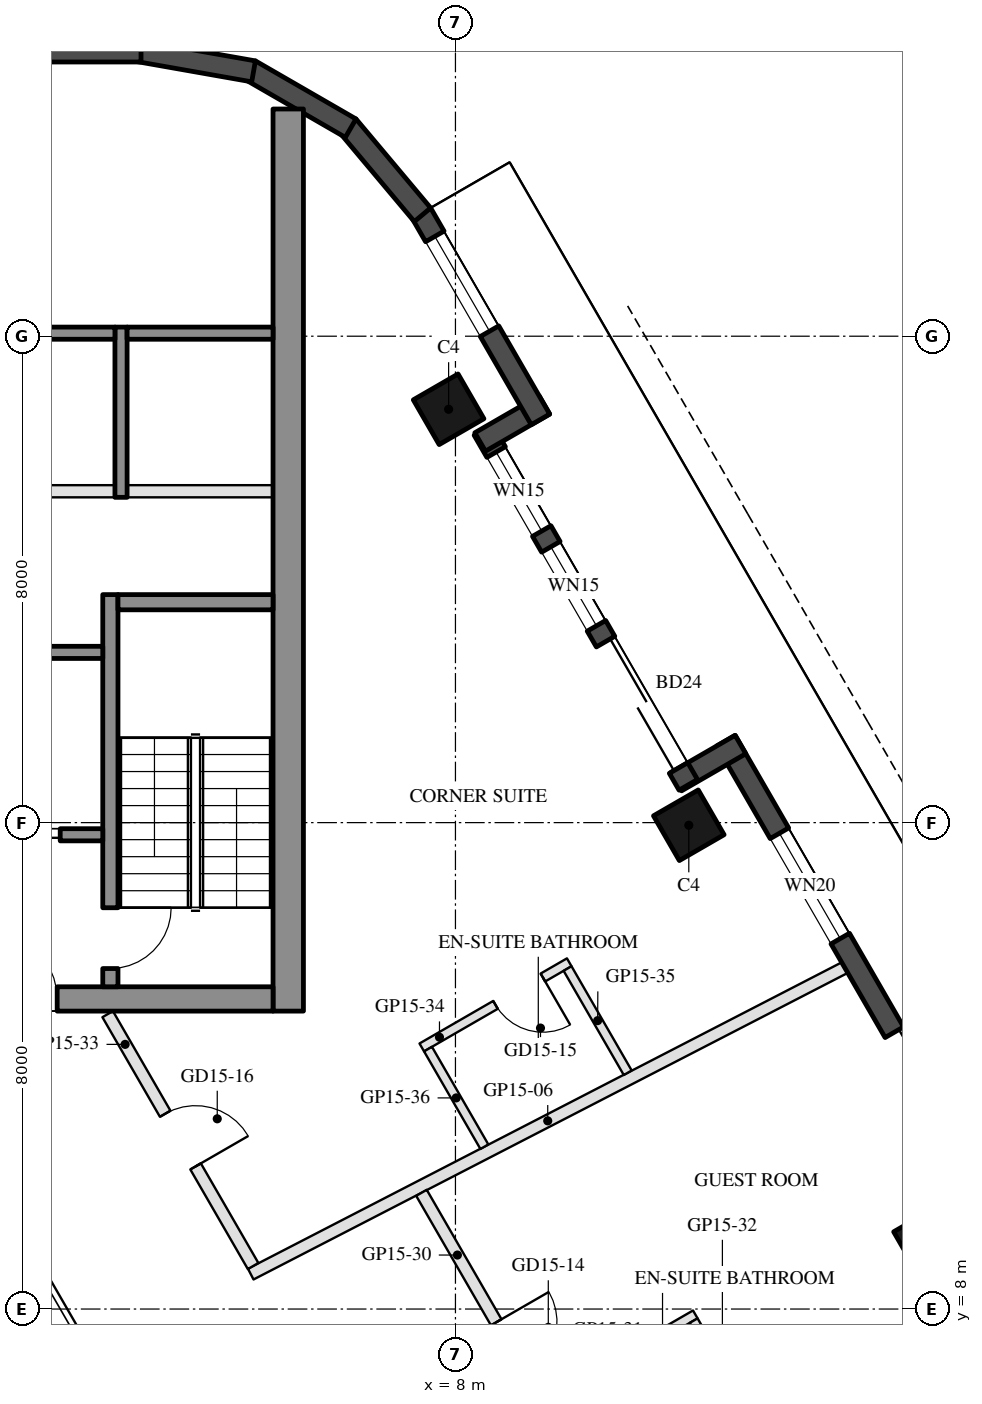
"""IFC4 building model, lengths in metres.
Left out: names, types, materials, properties, quantities, classifications, styles, units other than length and angle.
Written with IfcOpenShell. Run it as: python <this file> out.ifc"""

import sys

from ifc_helpers import new_model, si_unit, direction, frame, frame_2d, origin, origin_2d, place, context, subcontext, project, spatial, rectangle, hollow_rectangle, extrude, element, fill, save


model = new_model("IFC4")
c1 = context("Model", 3, precision=1e-05, world=origin(), true_north=direction((0.0, 1.0)))
c2 = subcontext(c1, "Body", "Model", "MODEL_VIEW")
j1 = project(units=[si_unit("LENGTHUNIT", "METRE"), si_unit("PLANEANGLEUNIT", "RADIAN")], contexts=[c1])
p1 = place(None, origin())
s1 = spatial("IfcSite", under=j1, at=p1, CompositionType="ELEMENT")
p2 = place(p1, origin())
s2 = spatial("IfcBuilding", under=s1, at=p2, CompositionType="ELEMENT")
p3 = place(p2, frame((0.0, 0.0, 168.8)))
s3 = spatial("IfcBuildingStorey", under=s2, at=p3, CompositionType="ELEMENT", Elevation=168.8)
for number, where, z_axis, x_axis in (
    (1, (15.788, 9.115, 0.0), (0.0, 0.0, 1.0), (-0.5, 0.866, 0.0)),
    (2, (11.838, 15.957, 0.0), (0.0, 0.0, 1.0), (-0.5, 0.866, 0.0)),
    (3, (7.888, 22.798, 0.0), (0.0, 0.0, 1.0), (-0.5, 0.866, 0.0)),
):
    element("IfcColumn", number, at=place(p3, frame(where, z_axis=z_axis, x_axis=x_axis)), inside=s3, PredefinedType="COLUMN", context=c2, shape_type="SweptSolid", body=[
        extrude(hollow_rectangle(XDim=0.85, YDim=0.85, WallThickness=0.04, at=origin_2d()), origin(), (0.0, 0.0, 1.0), 3.7),
    ])
p4 = place(p3, frame((17.299, 8.948, 0.0), z_axis=(0.0, 0.0, 1.0), x_axis=(-0.500010041276, 0.866019606374, 0.0)))
e4 = element("IfcWall", 4, at=p4, inside=s3, PredefinedType="SOLIDWALL", context=c2, shape_type="SweptSolid", body=[
    extrude(rectangle(XDim=9.7, YDim=0.35, at=frame_2d((4.85, 0.0))), origin(), (0.0, 0.0, 1.0), 3.55),
])
p5 = place(p4, frame((1.762, 0.0, 0.0)))
e5 = element("IfcOpeningElement", 5, at=p5, cuts=e4, PredefinedType="OPENING", context=c2, shape_type="SweptSolid", body=[
    extrude(rectangle(XDim=2.4, YDim=2.4, at=frame_2d((1.2, 1.2))), frame((0.0, 0.185, 0.0), z_axis=(0.0, -1.0, 0.0), x_axis=(1.0, 0.0, 0.0)), (0.0, 0.0, 1.0), 0.37),
])
p6 = place(p4, frame((5.941, 0.0, 0.3)))
e6 = element("IfcOpeningElement", 6, at=p6, cuts=e4, PredefinedType="OPENING", context=c2, shape_type="SweptSolid", body=[
    extrude(rectangle(XDim=2.0, YDim=2.65, at=frame_2d((1.0, 1.325))), frame((0.0, 0.185, 0.0), z_axis=(0.0, -1.0, 0.0), x_axis=(1.0, 0.0, 0.0)), (0.0, 0.0, 1.0), 0.37),
])
p7 = place(p3, frame((12.688, 17.284, 0.0), z_axis=(0.0, 0.0, 1.0), x_axis=(-0.865955602162, -0.500120880472, 0.0)))
e7 = element("IfcWall", 7, at=p7, inside=s3, PredefinedType="SOLIDWALL", context=c2, shape_type="SweptSolid", body=[
    extrude(rectangle(XDim=1.22, YDim=0.35, at=frame_2d((0.61, 0.0))), origin(), (0.0, 0.0, 1.0), 3.55),
])
p8 = place(p3, frame((11.829, 16.621, 0.0), z_axis=(0.0, 0.0, 1.0), x_axis=(-0.500003597184, 0.866023326939, 0.0)))
e8 = element("IfcWall", 8, at=p8, inside=s3, PredefinedType="SOLIDWALL", context=c2, shape_type="SweptSolid", body=[
    extrude(rectangle(XDim=6.74, YDim=0.35, at=frame_2d((3.37, 0.0))), origin(), (0.0, 0.0, 1.0), 3.55),
])
p9 = place(p8, frame((0.32, 0.0, 0.0)))
e9 = element("IfcOpeningElement", 9, at=p9, cuts=e8, PredefinedType="OPENING", context=c2, shape_type="SweptSolid", body=[
    extrude(rectangle(XDim=2.4, YDim=2.4, at=frame_2d((1.2, 1.2))), frame((0.0, 0.185, 0.0), z_axis=(0.0, -1.0, 0.0), x_axis=(1.0, 0.0, 0.0)), (0.0, 0.0, 1.0), 0.37),
])
p10 = place(p8, frame((3.02, 0.0, 0.3)))
e10 = element("IfcOpeningElement", 10, at=p10, cuts=e8, PredefinedType="OPENING", context=c2, shape_type="SweptSolid", body=[
    extrude(rectangle(XDim=1.5, YDim=2.65, at=frame_2d((0.75, 1.325))), frame((0.0, 0.185, 0.0), z_axis=(0.0, -1.0, 0.0), x_axis=(1.0, 0.0, 0.0)), (0.0, 0.0, 1.0), 0.37),
])
p11 = place(p8, frame((4.82, 0.0, 0.3)))
e11 = element("IfcOpeningElement", 11, at=p11, cuts=e8, PredefinedType="OPENING", context=c2, shape_type="SweptSolid", body=[
    extrude(rectangle(XDim=1.5, YDim=2.65, at=frame_2d((0.75, 1.325))), frame((0.0, 0.185, 0.0), z_axis=(0.0, -1.0, 0.0), x_axis=(1.0, 0.0, 0.0)), (0.0, 0.0, 1.0), 0.37),
])
p12 = place(p3, frame((8.406, 22.26, 0.0), z_axis=(0.0, 0.0, 1.0), x_axis=(0.865955602162, 0.500120880472, 0.0)))
e12 = element("IfcWall", 12, at=p12, inside=s3, PredefinedType="SOLIDWALL", context=c2, shape_type="SweptSolid", body=[
    extrude(rectangle(XDim=1.22, YDim=0.35, at=frame_2d((0.61, 0.0))), origin(), (0.0, 0.0, 1.0), 3.55),
])
p13 = place(p3, frame((9.398, 22.631, 0.0), z_axis=(0.0, 0.0, 1.0), x_axis=(-0.499954521343, 0.866051659307, 0.0)))
e13 = element("IfcWall", 13, at=p13, inside=s3, PredefinedType="SOLIDWALL", context=c2, shape_type="SweptSolid", body=[
    extrude(rectangle(XDim=3.916, YDim=0.35, at=frame_2d((1.958, 0.0))), origin(), (0.0, 0.0, 1.0), 3.55),
])
p14 = place(p13, frame((1.675, 0.0, 0.3)))
e14 = element("IfcOpeningElement", 14, at=p14, cuts=e13, PredefinedType="OPENING", context=c2, shape_type="SweptSolid", body=[
    extrude(rectangle(XDim=1.8, YDim=2.65, at=frame_2d((0.9, 1.325))), frame((0.0, 0.185, 0.0), z_axis=(0.0, -1.0, 0.0), x_axis=(1.0, 0.0, 0.0)), (0.0, 0.0, 1.0), 0.37),
])
p15 = place(p3, frame((7.458, 25.998, 0.0), z_axis=(0.0, 0.0, 1.0), x_axis=(-0.642808304945, 0.766027077259, 0.0)))
e15 = element("IfcWall", 15, at=p15, inside=s3, PredefinedType="SOLIDWALL", context=c2, shape_type="SweptSolid", body=[
    extrude(rectangle(XDim=1.91, YDim=0.35, at=frame_2d((0.955, 0.0))), origin(), (0.0, 0.0, 1.0), 3.55),
])
for number, where, z_axis, x_axis in (
    (16, (6.277, 27.422, 0.0), (0.0, 0.0, 1.0), (-0.866, 0.5, 0.0)),
    (17, (4.68, 28.356, 0.0), (0.0, 0.0, 1.0), (-0.985, 0.174, 0.0)),
):
    element("IfcWall", number, at=place(p3, frame(where, z_axis=z_axis, x_axis=x_axis)), inside=s3, PredefinedType="SOLIDWALL", context=c2, shape_type="SweptSolid", body=[
        extrude(rectangle(XDim=1.91, YDim=0.35, at=frame_2d((0.955, 0.0))), origin(), (0.0, 0.0, 1.0), 3.55),
    ])
p16 = place(p3, frame((2.829, 28.685, 0.0), z_axis=(0.0, 0.0, 1.0), x_axis=(-1.0, 0.0, 0.0)))
e18 = element("IfcWall", 18, at=p16, inside=s3, PredefinedType="SOLIDWALL", context=c2, shape_type="SweptSolid", body=[
    extrude(rectangle(XDim=5.658, YDim=0.35, at=frame_2d((2.829, 0.0))), origin(), (0.0, 0.0, 1.0), 3.55),
])
p17 = place(p3, frame((5.25, 12.9, 0.0), z_axis=(0.0, 0.0, 1.0), x_axis=(0.0, 1.0, 0.0)))
e19 = element("IfcWall", 19, at=p17, inside=s3, PredefinedType="SHEAR", context=c2, shape_type="SweptSolid", body=[
    extrude(rectangle(XDim=14.837, YDim=0.5, at=frame_2d((7.418, 0.0))), origin(), (0.0, 0.0, 1.0), 3.5),
])
p18 = place(p3, frame((5.0, 13.1, 0.0), z_axis=(0.0, 0.0, 1.0), x_axis=(-1.0, 0.0, 0.0)))
e20 = element("IfcWall", 20, at=p18, inside=s3, PredefinedType="SHEAR", context=c2, shape_type="SweptSolid", body=[
    extrude(rectangle(XDim=10.0, YDim=0.4, at=frame_2d((5.0, 0.0))), origin(), (0.0, 0.0, 1.0), 3.5),
])
p19 = place(p18, frame((3.55, 0.0, 0.0)))
e21 = element("IfcOpeningElement", 21, at=p19, cuts=e20, PredefinedType="OPENING", context=c2, shape_type="SweptSolid", body=[
    extrude(rectangle(XDim=1.1, YDim=2.1, at=frame_2d((0.55, 1.05))), frame((0.0, 0.21, 0.0), z_axis=(0.0, -1.0, 0.0), x_axis=(1.0, 0.0, 0.0)), (0.0, 0.0, 1.0), 0.42),
])
p20 = place(p18, frame((5.85, 0.0, 0.0)))
e22 = element("IfcOpeningElement", 22, at=p20, cuts=e20, PredefinedType="OPENING", context=c2, shape_type="SweptSolid", body=[
    extrude(rectangle(XDim=1.4, YDim=2.1, at=frame_2d((0.7, 1.05))), frame((0.0, 0.21, 0.0), z_axis=(0.0, -1.0, 0.0), x_axis=(1.0, 0.0, 0.0)), (0.0, 0.0, 1.0), 0.42),
])
p21 = place(p3, frame((2.325, 13.3, 0.0), z_axis=(0.0, 0.0, 1.0), x_axis=(0.0, 1.0, 0.0)))
e23 = element("IfcWall", 23, at=p21, inside=s3, PredefinedType="SHEAR", context=c2, shape_type="SweptSolid", body=[
    extrude(rectangle(XDim=6.45, YDim=0.25, at=frame_2d((3.225, 0.0))), origin(), (0.0, 0.0, 1.0), 3.5),
])
p22 = place(p21, frame((0.3, 0.0, 0.0)))
e24 = element("IfcOpeningElement", 24, at=p22, cuts=e23, PredefinedType="OPENING", context=c2, shape_type="SweptSolid", body=[
    extrude(rectangle(XDim=1.0, YDim=2.1, at=frame_2d((0.5, 1.05))), frame((0.0, 0.135, 0.0), z_axis=(0.0, -1.0, 0.0), x_axis=(1.0, 0.0, 0.0)), (0.0, 0.0, 1.0), 0.27),
])
p23 = place(p3, frame((5.0, 19.625, 0.0), z_axis=(0.0, 0.0, 1.0), x_axis=(-1.0, 0.0, 0.0)))
e25 = element("IfcWall", 25, at=p23, inside=s3, PredefinedType="SHEAR", context=c2, shape_type="SweptSolid", body=[
    extrude(rectangle(XDim=2.55, YDim=0.25, at=frame_2d((1.275, 0.0))), origin(), (0.0, 0.0, 1.0), 3.5),
])
p24 = place(p3, frame((2.2, 18.8, 0.0), z_axis=(0.0, 0.0, 1.0), x_axis=(-1.0, 0.0, 0.0)))
e26 = element("IfcWall", 26, at=p24, inside=s3, PredefinedType="SHEAR", context=c2, shape_type="SweptSolid", body=[
    extrude(rectangle(XDim=2.8, YDim=0.2, at=frame_2d((1.4, 0.0))), origin(), (0.0, 0.0, 1.0), 3.5),
])
p25 = place(p3, frame((2.2, 15.8, 0.0), z_axis=(0.0, 0.0, 1.0), x_axis=(-1.0, 0.0, 0.0)))
e27 = element("IfcWall", 27, at=p25, inside=s3, PredefinedType="SHEAR", context=c2, shape_type="SweptSolid", body=[
    extrude(rectangle(XDim=2.8, YDim=0.2, at=frame_2d((1.4, 0.0))), origin(), (0.0, 0.0, 1.0), 3.5),
])
p26 = place(p25, frame((0.7, 0.0, 0.0)))
e28 = element("IfcOpeningElement", 28, at=p26, cuts=e27, PredefinedType="OPENING", context=c2, shape_type="SweptSolid", body=[
    extrude(rectangle(XDim=1.2, YDim=2.1, at=frame_2d((0.6, 1.05))), frame((0.0, 0.11, 0.0), z_axis=(0.0, -1.0, 0.0), x_axis=(1.0, 0.0, 0.0)), (0.0, 0.0, 1.0), 0.22),
])
p27 = place(p3, frame((2.5, 21.35, 0.0), z_axis=(0.0, 0.0, 1.0), x_axis=(0.0, 1.0, 0.0)))
e29 = element("IfcWall", 29, at=p27, inside=s3, PredefinedType="SHEAR", context=c2, shape_type="SweptSolid", body=[
    extrude(rectangle(XDim=2.8, YDim=0.2, at=frame_2d((1.4, 0.0))), origin(), (0.0, 0.0, 1.0), 3.5),
])
p28 = place(p3, frame((5.0, 24.05, 0.0), z_axis=(0.0, 0.0, 1.0), x_axis=(-1.0, 0.0, 0.0)))
e30 = element("IfcWall", 30, at=p28, inside=s3, PredefinedType="SHEAR", context=c2, shape_type="SweptSolid", body=[
    extrude(rectangle(XDim=2.4, YDim=0.2, at=frame_2d((1.2, 0.0))), origin(), (0.0, 0.0, 1.0), 3.5),
])
p29 = place(p3, frame((2.4, 24.05, 0.0), z_axis=(0.0, 0.0, 1.0), x_axis=(-1.0, 0.0, 0.0)))
e31 = element("IfcWall", 31, at=p29, inside=s3, PredefinedType="SHEAR", context=c2, shape_type="SweptSolid", body=[
    extrude(rectangle(XDim=2.8, YDim=0.2, at=frame_2d((1.4, 0.0))), origin(), (0.0, 0.0, 1.0), 3.5),
])
p30 = place(p3, frame((5.0, 21.45, 0.0), z_axis=(0.0, 0.0, 1.0), x_axis=(-1.0, 0.0, 0.0)))
e32 = element("IfcWall", 32, at=p30, inside=s3, PredefinedType="PARTITIONING", context=c2, shape_type="SweptSolid", body=[
    extrude(rectangle(XDim=2.4, YDim=0.2, at=frame_2d((1.2, 0.0))), origin(), (0.0, 0.0, 1.0), 3.5),
])
p31 = place(p3, frame((2.4, 21.45, 0.0), z_axis=(0.0, 0.0, 1.0), x_axis=(-1.0, 0.0, 0.0)))
e33 = element("IfcWall", 33, at=p31, inside=s3, PredefinedType="PARTITIONING", context=c2, shape_type="SweptSolid", body=[
    extrude(rectangle(XDim=2.8, YDim=0.2, at=frame_2d((1.4, 0.0))), origin(), (0.0, 0.0, 1.0), 3.5),
])
p32 = place(p3, frame((16.543, 8.106, 0.0), z_axis=(0.0, 0.0, 1.0), x_axis=(-0.873587451419, -0.486667201199, 0.0)))
e34 = element("IfcWall", 34, at=p32, inside=s3, PredefinedType="PARTITIONING", context=c2, shape_type="SweptSolid", body=[
    extrude(rectangle(XDim=7.081, YDim=0.2, at=frame_2d((3.541, 0.0))), origin(), (0.0, 0.0, 1.0), 3.06),
])
p33 = place(p3, frame((14.402, 13.615, 0.0), z_axis=(0.0, 0.0, 1.0), x_axis=(-0.888691893785, -0.458504872299, 0.0)))
e35 = element("IfcWall", 35, at=p33, inside=s3, PredefinedType="PARTITIONING", context=c2, shape_type="SweptSolid", body=[
    extrude(rectangle(XDim=10.992, YDim=0.2, at=frame_2d((5.496, 0.0))), origin(), (0.0, 0.0, 1.0), 3.06),
])
p34 = place(p3, frame((7.441, 9.911, 0.0), z_axis=(0.0, 0.0, 1.0), x_axis=(0.500006275671, -0.866021780494, 0.0)))
e36 = element("IfcWall", 36, at=p34, inside=s3, PredefinedType="PARTITIONING", context=c2, shape_type="SweptSolid", body=[
    extrude(rectangle(XDim=5.907, YDim=0.2, at=frame_2d((2.954, 0.0))), origin(), (0.0, 0.0, 1.0), 2.95),
])
p35 = place(p34, frame((2.458, 0.0, 0.0)))
e37 = element("IfcOpeningElement", 37, at=p35, cuts=e36, PredefinedType="OPENING", context=c2, shape_type="SweptSolid", body=[
    extrude(rectangle(XDim=1.0, YDim=2.1, at=frame_2d((0.5, 1.05))), frame((0.0, 0.11, 0.0), z_axis=(0.0, -1.0, 0.0), x_axis=(1.0, 0.0, 0.0)), (0.0, 0.0, 1.0), 0.22),
])
p36 = place(p3, frame((11.945, 7.911, 0.0), z_axis=(0.0, 0.0, 1.0), x_axis=(-0.865996816683, -0.500049511043, 0.0)))
e38 = element("IfcWall", 38, at=p36, inside=s3, PredefinedType="PARTITIONING", context=c2, shape_type="SweptSolid", body=[
    extrude(rectangle(XDim=2.8, YDim=0.15, at=frame_2d((1.4, 0.0))), origin(), (0.0, 0.0, 1.0), 3.55),
])
p37 = place(p36, frame((0.5, 0.0, 0.0)))
e39 = element("IfcOpeningElement", 39, at=p37, cuts=e38, PredefinedType="OPENING", context=c2, shape_type="SweptSolid", body=[
    extrude(rectangle(XDim=0.9, YDim=2.1, at=frame_2d((0.45, 1.05))), frame((0.0, 0.085, 0.0), z_axis=(0.0, -1.0, 0.0), x_axis=(1.0, 0.0, 0.0)), (0.0, 0.0, 1.0), 0.17),
])
p38 = place(p3, frame((12.863, 6.171, 0.0), z_axis=(0.0, 0.0, 1.0), x_axis=(-0.499998034377, 0.866026538634, 0.0)))
e40 = element("IfcWall", 40, at=p38, inside=s3, PredefinedType="PARTITIONING", context=c2, shape_type="SweptSolid", body=[
    extrude(rectangle(XDim=1.892, YDim=0.15, at=frame_2d((0.946, 0.0))), origin(), (0.0, 0.0, 1.0), 2.95),
])
p39 = place(p3, frame((2.281, 12.85, 0.0), z_axis=(0.0, 0.0, 1.0), x_axis=(0.499981649923, -0.866035997947, 0.0)))
e41 = element("IfcWall", 41, at=p39, inside=s3, PredefinedType="PARTITIONING", context=c2, shape_type="SweptSolid", body=[
    extrude(rectangle(XDim=4.783, YDim=0.2, at=frame_2d((2.392, 0.0))), origin(), (0.0, 0.0, 1.0), 2.95),
])
p40 = place(p39, frame((1.892, 0.0, 0.0)))
e42 = element("IfcOpeningElement", 42, at=p40, cuts=e41, PredefinedType="OPENING", context=c2, shape_type="SweptSolid", body=[
    extrude(rectangle(XDim=1.0, YDim=2.1, at=frame_2d((0.5, 1.05))), frame((0.0, 0.11, 0.0), z_axis=(0.0, -1.0, 0.0), x_axis=(1.0, 0.0, 0.0)), (0.0, 0.0, 1.0), 0.22),
])
p41 = place(p3, frame((9.871, 13.702, 0.0), z_axis=(0.0, 0.0, 1.0), x_axis=(-0.866034573852, -0.49998411664, 0.0)))
e43 = element("IfcWall", 43, at=p41, inside=s3, PredefinedType="PARTITIONING", context=c2, shape_type="SweptSolid", body=[
    extrude(rectangle(XDim=2.8, YDim=0.15, at=frame_2d((1.4, 0.0))), origin(), (0.0, 0.0, 1.0), 3.55),
])
p42 = place(p41, frame((0.5, 0.0, 0.0)))
e44 = element("IfcOpeningElement", 44, at=p42, cuts=e43, PredefinedType="OPENING", context=c2, shape_type="SweptSolid", body=[
    extrude(rectangle(XDim=0.9, YDim=2.1, at=frame_2d((0.45, 1.05))), frame((0.0, 0.085, 0.0), z_axis=(0.0, -1.0, 0.0), x_axis=(1.0, 0.0, 0.0)), (0.0, 0.0, 1.0), 0.17),
])
p43 = place(p3, frame((10.833, 11.886, 0.0), z_axis=(0.0, 0.0, 1.0), x_axis=(-0.500000102728, 0.866025344474, 0.0)))
e45 = element("IfcWall", 45, at=p43, inside=s3, PredefinedType="PARTITIONING", context=c2, shape_type="SweptSolid", body=[
    extrude(rectangle(XDim=1.979, YDim=0.15, at=frame_2d((0.99, 0.0))), origin(), (0.0, 0.0, 1.0), 3.55),
])
p44 = place(p3, frame((8.476, 10.67, 0.0), z_axis=(0.0, 0.0, 1.0), x_axis=(-0.499992292652, 0.866029853578, 0.0)))
e46 = element("IfcWall", 46, at=p44, inside=s3, PredefinedType="PARTITIONING", context=c2, shape_type="SweptSolid", body=[
    extrude(rectangle(XDim=1.854, YDim=0.15, at=frame_2d((0.927, 0.0))), origin(), (0.0, 0.0, 1.0), 3.55),
])
p45 = place(p5, frame((2.4, 0.0, 0.0), z_axis=(0.0, 0.0, 1.0), x_axis=(-1.0, 0.0, 0.0)))
e47 = element("IfcDoor", 47, at=p45, inside=s3, OperationType="SLIDING_TO_LEFT", PredefinedType="DOOR", context=c2, shape_type="SweptSolid", body=[
    extrude(rectangle(XDim=2.4, YDim=2.4, at=frame_2d((1.2, 1.2))), frame((0.0, 0.025, 0.0), z_axis=(0.0, -1.0, 0.0), x_axis=(1.0, 0.0, 0.0)), (0.0, 0.0, 1.0), 0.05),
])
fill(e5, e47)
p46 = place(p6, origin())
e48 = element("IfcWindow", 48, at=p46, inside=s3, PartitioningType="SINGLE_PANEL", PredefinedType="WINDOW", context=c2, shape_type="SweptSolid", body=[
    extrude(rectangle(XDim=2.0, YDim=2.65, at=frame_2d((1.0, 1.325))), frame((0.0, 0.03, 0.0), z_axis=(0.0, -1.0, 0.0), x_axis=(1.0, 0.0, 0.0)), (0.0, 0.0, 1.0), 0.06),
])
fill(e6, e48)
p47 = place(p9, frame((2.4, 0.0, 0.0), z_axis=(0.0, 0.0, 1.0), x_axis=(-1.0, 0.0, 0.0)))
e49 = element("IfcDoor", 49, at=p47, inside=s3, OperationType="SLIDING_TO_LEFT", PredefinedType="DOOR", context=c2, shape_type="SweptSolid", body=[
    extrude(rectangle(XDim=2.4, YDim=2.4, at=frame_2d((1.2, 1.2))), frame((0.0, 0.025, 0.0), z_axis=(0.0, -1.0, 0.0), x_axis=(1.0, 0.0, 0.0)), (0.0, 0.0, 1.0), 0.05),
])
fill(e9, e49)
p48 = place(p10, origin())
e50 = element("IfcWindow", 50, at=p48, inside=s3, PartitioningType="SINGLE_PANEL", PredefinedType="WINDOW", context=c2, shape_type="SweptSolid", body=[
    extrude(rectangle(XDim=1.5, YDim=2.65, at=frame_2d((0.75, 1.325))), frame((0.0, 0.03, 0.0), z_axis=(0.0, -1.0, 0.0), x_axis=(1.0, 0.0, 0.0)), (0.0, 0.0, 1.0), 0.06),
])
fill(e10, e50)
p49 = place(p11, origin())
e51 = element("IfcWindow", 51, at=p49, inside=s3, PartitioningType="SINGLE_PANEL", PredefinedType="WINDOW", context=c2, shape_type="SweptSolid", body=[
    extrude(rectangle(XDim=1.5, YDim=2.65, at=frame_2d((0.75, 1.325))), frame((0.0, 0.03, 0.0), z_axis=(0.0, -1.0, 0.0), x_axis=(1.0, 0.0, 0.0)), (0.0, 0.0, 1.0), 0.06),
])
fill(e11, e51)
p50 = place(p14, origin())
e52 = element("IfcWindow", 52, at=p50, inside=s3, PartitioningType="SINGLE_PANEL", PredefinedType="WINDOW", context=c2, shape_type="SweptSolid", body=[
    extrude(rectangle(XDim=1.8, YDim=2.65, at=frame_2d((0.9, 1.325))), frame((0.0, 0.03, 0.0), z_axis=(0.0, -1.0, 0.0), x_axis=(1.0, 0.0, 0.0)), (0.0, 0.0, 1.0), 0.06),
])
fill(e14, e52)
p51 = place(p26, origin())
e53 = element("IfcDoor", 53, at=p51, inside=s3, OperationType="DOUBLE_DOOR_SLIDING", PredefinedType="DOOR", context=c2, shape_type="SweptSolid", body=[
    extrude(rectangle(XDim=1.2, YDim=2.1, at=frame_2d((0.6, 1.05))), frame((0.0, 0.025, 0.0), z_axis=(0.0, -1.0, 0.0), x_axis=(1.0, 0.0, 0.0)), (0.0, 0.0, 1.0), 0.05),
])
fill(e28, e53)
p52 = place(p19, frame((1.1, 0.0, 0.0), z_axis=(0.0, 0.0, 1.0), x_axis=(-1.0, 0.0, 0.0)))
e54 = element("IfcDoor", 54, at=p52, inside=s3, OperationType="SINGLE_SWING_LEFT", PredefinedType="DOOR", context=c2, shape_type="SweptSolid", body=[
    extrude(rectangle(XDim=1.1, YDim=2.1, at=frame_2d((0.55, 1.05))), frame((0.0, 0.025, 0.0), z_axis=(0.0, -1.0, 0.0), x_axis=(1.0, 0.0, 0.0)), (0.0, 0.0, 1.0), 0.05),
])
fill(e21, e54)
p53 = place(p22, frame((1.0, 0.0, 0.0), z_axis=(0.0, 0.0, 1.0), x_axis=(-1.0, 0.0, 0.0)))
e55 = element("IfcDoor", 55, at=p53, inside=s3, OperationType="SINGLE_SWING_LEFT", PredefinedType="DOOR", context=c2, shape_type="SweptSolid", body=[
    extrude(rectangle(XDim=1.0, YDim=2.1, at=frame_2d((0.5, 1.05))), frame((0.0, 0.025, 0.0), z_axis=(0.0, -1.0, 0.0), x_axis=(1.0, 0.0, 0.0)), (0.0, 0.0, 1.0), 0.05),
])
fill(e24, e55)
p54 = place(p35, origin())
e56 = element("IfcDoor", 56, at=p54, inside=s3, OperationType="SINGLE_SWING_LEFT", PredefinedType="DOOR", context=c2, shape_type="SweptSolid", body=[
    extrude(rectangle(XDim=1.0, YDim=2.1, at=frame_2d((0.5, 1.05))), frame((0.0, 0.025, 0.0), z_axis=(0.0, -1.0, 0.0), x_axis=(1.0, 0.0, 0.0)), (0.0, 0.0, 1.0), 0.05),
])
fill(e37, e56)
p55 = place(p42, origin())
e57 = element("IfcDoor", 57, at=p55, inside=s3, OperationType="SINGLE_SWING_LEFT", PredefinedType="DOOR", context=c2, shape_type="SweptSolid", body=[
    extrude(rectangle(XDim=0.9, YDim=2.1, at=frame_2d((0.45, 1.05))), frame((0.0, 0.025, 0.0), z_axis=(0.0, -1.0, 0.0), x_axis=(1.0, 0.0, 0.0)), (0.0, 0.0, 1.0), 0.05),
])
fill(e44, e57)
p56 = place(p40, origin())
e58 = element("IfcDoor", 58, at=p56, inside=s3, OperationType="SINGLE_SWING_RIGHT", PredefinedType="DOOR", context=c2, shape_type="SweptSolid", body=[
    extrude(rectangle(XDim=1.0, YDim=2.1, at=frame_2d((0.5, 1.05))), frame((0.0, 0.025, 0.0), z_axis=(0.0, -1.0, 0.0), x_axis=(1.0, 0.0, 0.0)), (0.0, 0.0, 1.0), 0.05),
])
fill(e42, e58)
save(model, sys.argv[1])
